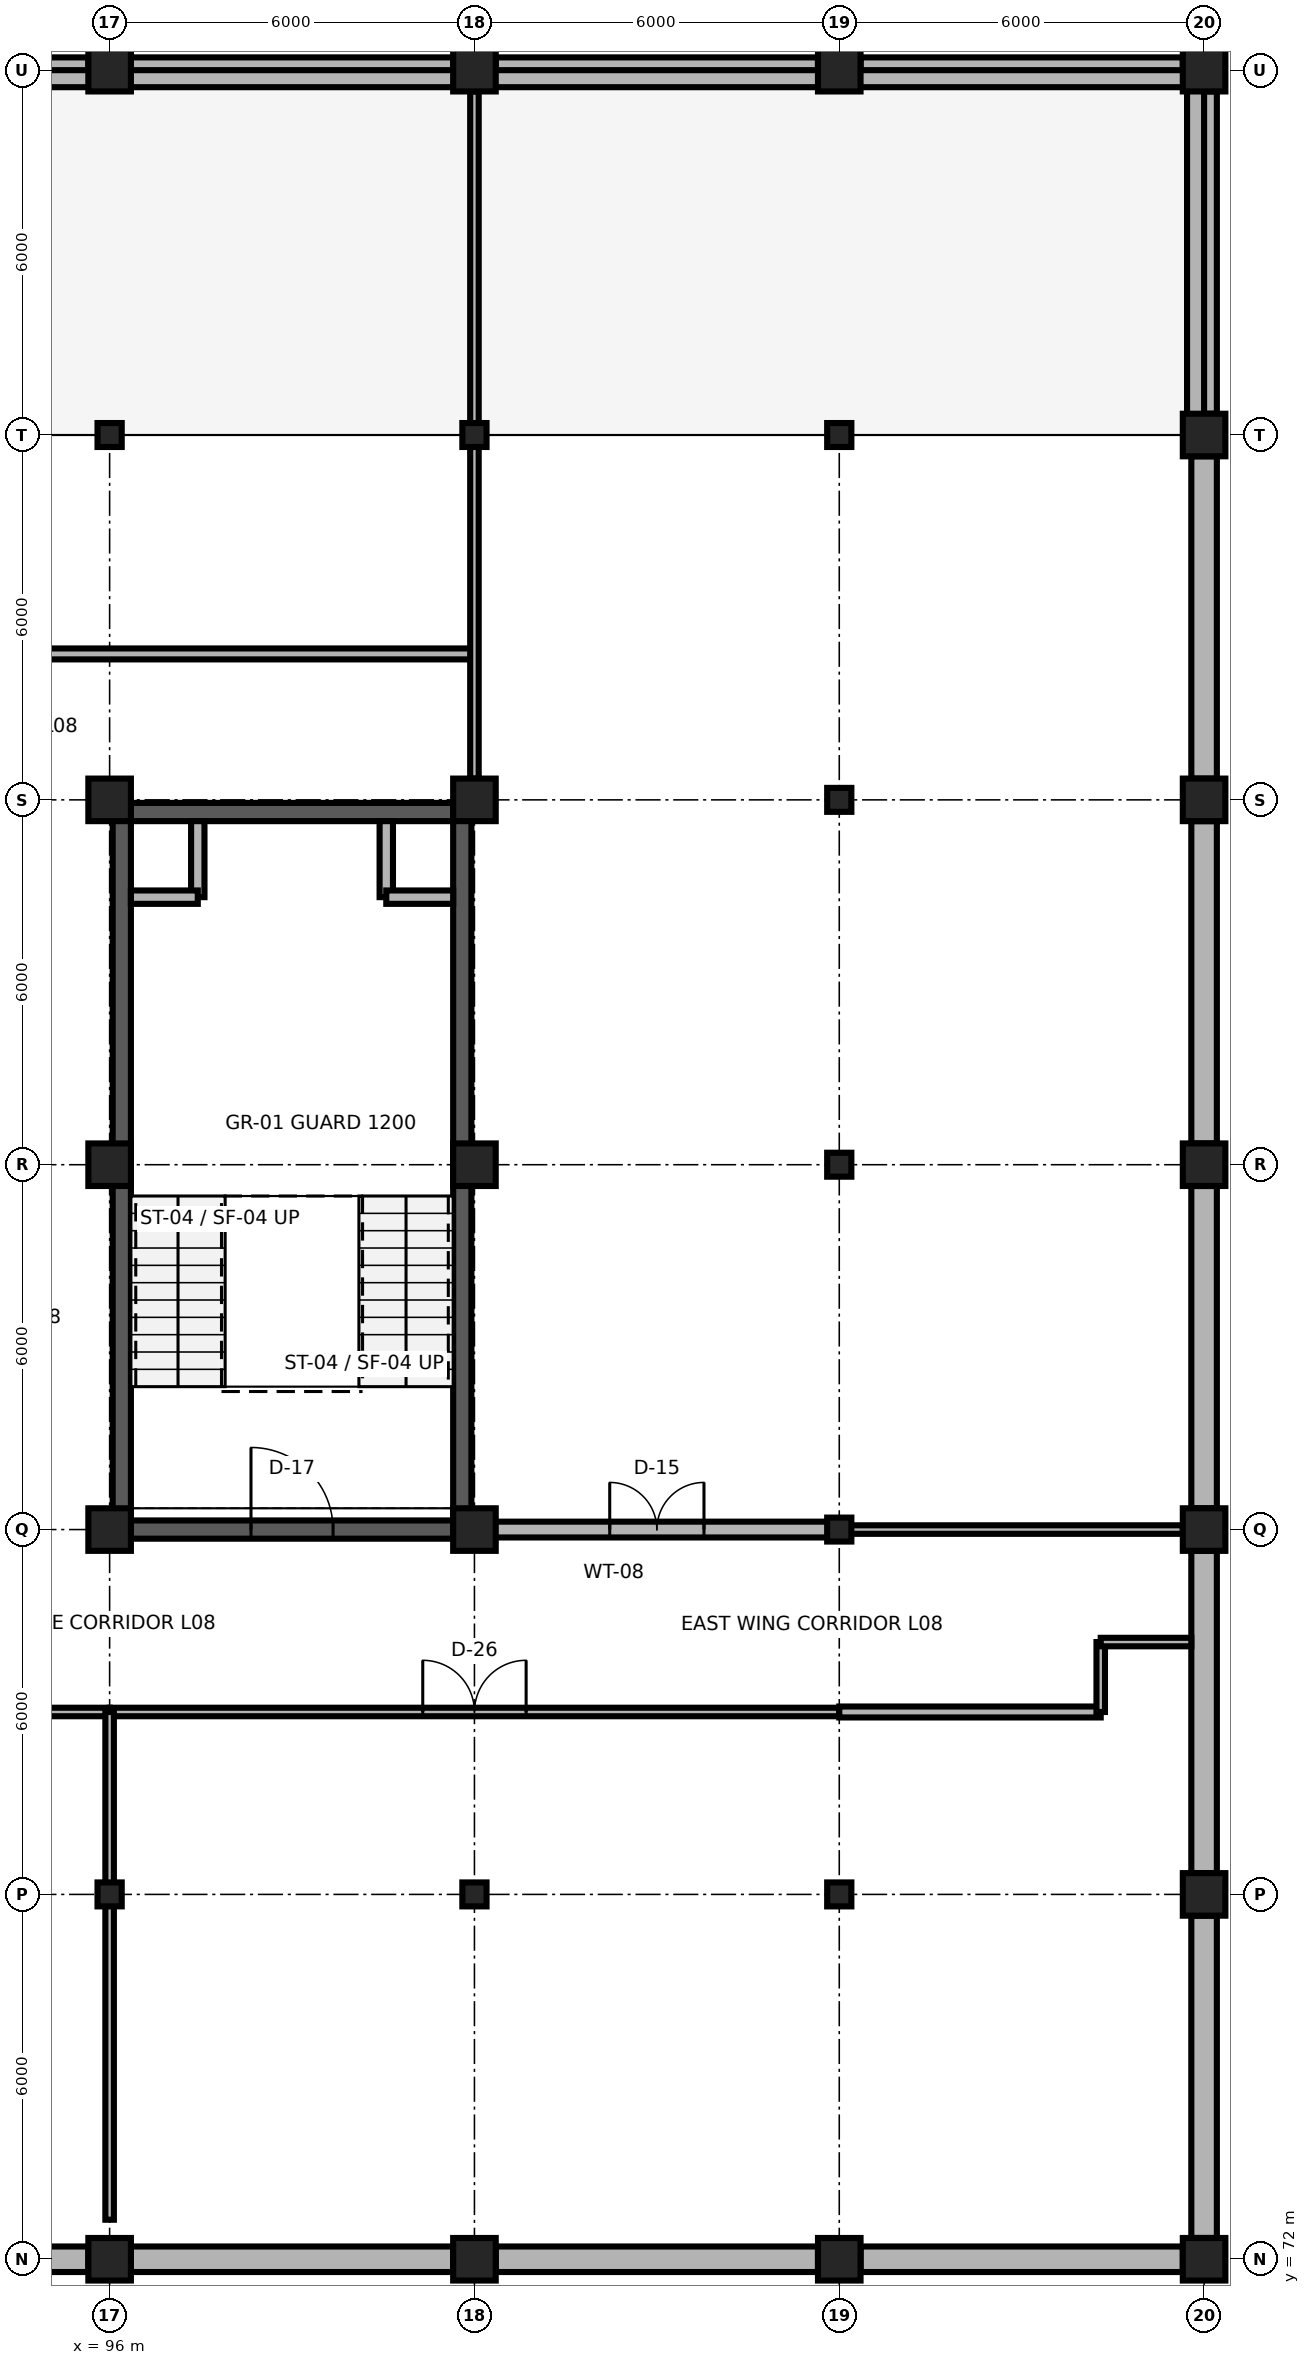
"""IFC4 building model, lengths in metres.
Left out: names, types, materials, properties, quantities, classifications, styles, units other than length and angle.
Written with IfcOpenShell. Run it as: python <this file> out.ifc"""

import sys

from ifc_helpers import new_model, si_unit, direction, frame, frame_2d, origin, origin_2d, place, context, subcontext, project, spatial, rectangle, i_section, extrude, element, fill, save


model = new_model("IFC4")
c1 = context("Model", 3, precision=1e-05, world=origin(), true_north=direction((0.0, 1.0)))
c2 = subcontext(c1, "Body", "Model", "MODEL_VIEW")
j1 = project(units=[si_unit("LENGTHUNIT", "METRE"), si_unit("PLANEANGLEUNIT", "RADIAN")], contexts=[c1])
p1 = place(None, origin())
s1 = spatial("IfcSite", under=j1, at=p1, CompositionType="ELEMENT")
p2 = place(p1, origin())
s2 = spatial("IfcBuilding", under=s1, at=p2, CompositionType="ELEMENT")
p3 = place(p2, frame((0.0, 0.0, 32.7)))
s3 = spatial("IfcBuildingStorey", under=s2, at=p3, CompositionType="ELEMENT", Elevation=32.7)
for number, where, z_axis, x_axis in (
    (1, (96.0, 72.0, 0.0), (0.0, 0.0, 1.0), (1.0, 0.0, 0.0)),
    (2, (102.0, 72.0, 0.0), (0.0, 0.0, 1.0), (1.0, 0.0, 0.0)),
    (3, (108.0, 72.0, 0.0), (0.0, 0.0, 1.0), (1.0, 0.0, 0.0)),
):
    element("IfcColumn", number, at=place(p3, frame(where, z_axis=z_axis, x_axis=x_axis)), inside=s3, PredefinedType="COLUMN", context=c2, shape_type="SweptSolid", body=[
        extrude(rectangle(XDim=0.7, YDim=0.7, at=origin_2d()), origin(), (0.0, 0.0, 1.0), 3.9),
    ])
p4 = place(p3, frame((114.0, 72.0, 0.0), z_axis=(0.0, 0.0, 1.0), x_axis=(1.0, 0.0, 0.0)))
e4 = element("IfcColumn", 4, at=p4, inside=s3, PredefinedType="COLUMN", context=c2, shape_type="SweptSolid", body=[
    extrude(rectangle(XDim=0.7, YDim=0.7, at=origin_2d()), origin(), (0.0, 0.0, 1.0), 3.68),
])
for number, where, z_axis, x_axis in (
    (5, (96.0, 78.0, 0.0), (0.0, 0.0, 1.0), (1.0, 0.0, 0.0)),
    (6, (102.0, 78.0, 0.0), (0.0, 0.0, 1.0), (1.0, 0.0, 0.0)),
    (7, (108.0, 78.0, 0.0), (0.0, 0.0, 1.0), (1.0, 0.0, 0.0)),
):
    element("IfcColumn", number, at=place(p3, frame(where, z_axis=z_axis, x_axis=x_axis)), inside=s3, PredefinedType="COLUMN", context=c2, shape_type="SweptSolid", body=[
        extrude(i_section(OverallWidth=0.398, OverallDepth=0.394, WebThickness=0.011, FlangeThickness=0.018, FilletRadius=0.022, at=origin_2d()), origin(), (0.0, 0.0, 1.0), 3.9),
    ])
p5 = place(p3, frame((114.0, 78.0, 0.0), z_axis=(0.0, 0.0, 1.0), x_axis=(1.0, 0.0, 0.0)))
e8 = element("IfcColumn", 8, at=p5, inside=s3, PredefinedType="COLUMN", context=c2, shape_type="SweptSolid", body=[
    extrude(rectangle(XDim=0.7, YDim=0.7, at=origin_2d()), origin(), (0.0, 0.0, 1.0), 3.68),
])
for number, where, z_axis, x_axis in (
    (9, (96.0, 84.0, 0.0), (0.0, 0.0, 1.0), (1.0, 0.0, 0.0)),
    (10, (102.0, 84.0, 0.0), (0.0, 0.0, 1.0), (1.0, 0.0, 0.0)),
):
    element("IfcColumn", number, at=place(p3, frame(where, z_axis=z_axis, x_axis=x_axis)), inside=s3, PredefinedType="COLUMN", context=c2, shape_type="SweptSolid", body=[
        extrude(rectangle(XDim=0.7, YDim=0.7, at=origin_2d()), origin(), (0.0, 0.0, 1.0), 3.9),
    ])
p6 = place(p3, frame((108.0, 84.0, 0.0), z_axis=(0.0, 0.0, 1.0), x_axis=(1.0, 0.0, 0.0)))
e11 = element("IfcColumn", 11, at=p6, inside=s3, PredefinedType="COLUMN", context=c2, shape_type="SweptSolid", body=[
    extrude(i_section(OverallWidth=0.398, OverallDepth=0.394, WebThickness=0.011, FlangeThickness=0.018, FilletRadius=0.022, at=origin_2d()), origin(), (0.0, 0.0, 1.0), 3.9),
])
p7 = place(p3, frame((114.0, 84.0, 0.0), z_axis=(0.0, 0.0, 1.0), x_axis=(1.0, 0.0, 0.0)))
e12 = element("IfcColumn", 12, at=p7, inside=s3, PredefinedType="COLUMN", context=c2, shape_type="SweptSolid", body=[
    extrude(rectangle(XDim=0.7, YDim=0.7, at=origin_2d()), origin(), (0.0, 0.0, 1.0), 3.68),
])
for number, where, z_axis, x_axis in (
    (13, (96.0, 90.0, 0.0), (0.0, 0.0, 1.0), (1.0, 0.0, 0.0)),
    (14, (102.0, 90.0, 0.0), (0.0, 0.0, 1.0), (1.0, 0.0, 0.0)),
):
    element("IfcColumn", number, at=place(p3, frame(where, z_axis=z_axis, x_axis=x_axis)), inside=s3, PredefinedType="COLUMN", context=c2, shape_type="SweptSolid", body=[
        extrude(rectangle(XDim=0.7, YDim=0.7, at=origin_2d()), origin(), (0.0, 0.0, 1.0), 3.9),
    ])
p8 = place(p3, frame((108.0, 90.0, 0.0), z_axis=(0.0, 0.0, 1.0), x_axis=(1.0, 0.0, 0.0)))
e15 = element("IfcColumn", 15, at=p8, inside=s3, PredefinedType="COLUMN", context=c2, shape_type="SweptSolid", body=[
    extrude(i_section(OverallWidth=0.398, OverallDepth=0.394, WebThickness=0.011, FlangeThickness=0.018, FilletRadius=0.022, at=origin_2d()), origin(), (0.0, 0.0, 1.0), 3.9),
])
p9 = place(p3, frame((114.0, 90.0, 0.0), z_axis=(0.0, 0.0, 1.0), x_axis=(1.0, 0.0, 0.0)))
e16 = element("IfcColumn", 16, at=p9, inside=s3, PredefinedType="COLUMN", context=c2, shape_type="SweptSolid", body=[
    extrude(rectangle(XDim=0.7, YDim=0.7, at=origin_2d()), origin(), (0.0, 0.0, 1.0), 3.68),
])
for number, where, z_axis, x_axis in (
    (17, (96.0, 96.0, 0.0), (0.0, 0.0, 1.0), (1.0, 0.0, 0.0)),
    (18, (102.0, 96.0, 0.0), (0.0, 0.0, 1.0), (1.0, 0.0, 0.0)),
):
    element("IfcColumn", number, at=place(p3, frame(where, z_axis=z_axis, x_axis=x_axis)), inside=s3, PredefinedType="COLUMN", context=c2, shape_type="SweptSolid", body=[
        extrude(rectangle(XDim=0.7, YDim=0.7, at=origin_2d()), origin(), (0.0, 0.0, 1.0), 3.9),
    ])
p10 = place(p3, frame((108.0, 96.0, 0.0), z_axis=(0.0, 0.0, 1.0), x_axis=(1.0, 0.0, 0.0)))
e19 = element("IfcColumn", 19, at=p10, inside=s3, PredefinedType="COLUMN", context=c2, shape_type="SweptSolid", body=[
    extrude(i_section(OverallWidth=0.398, OverallDepth=0.394, WebThickness=0.011, FlangeThickness=0.018, FilletRadius=0.022, at=origin_2d()), origin(), (0.0, 0.0, 1.0), 3.9),
])
p11 = place(p3, frame((114.0, 96.0, 0.0), z_axis=(0.0, 0.0, 1.0), x_axis=(1.0, 0.0, 0.0)))
e20 = element("IfcColumn", 20, at=p11, inside=s3, PredefinedType="COLUMN", context=c2, shape_type="SweptSolid", body=[
    extrude(rectangle(XDim=0.7, YDim=0.7, at=origin_2d()), origin(), (0.0, 0.0, 1.0), 3.68),
])
for number, where, z_axis, x_axis in (
    (21, (96.0, 102.0, 0.0), (0.0, 0.0, 1.0), (1.0, 0.0, 0.0)),
    (22, (102.0, 102.0, 0.0), (0.0, 0.0, 1.0), (1.0, 0.0, 0.0)),
    (23, (108.0, 102.0, 0.0), (0.0, 0.0, 1.0), (1.0, 0.0, 0.0)),
):
    element("IfcColumn", number, at=place(p3, frame(where, z_axis=z_axis, x_axis=x_axis)), inside=s3, PredefinedType="COLUMN", context=c2, shape_type="SweptSolid", body=[
        extrude(i_section(OverallWidth=0.398, OverallDepth=0.394, WebThickness=0.011, FlangeThickness=0.018, FilletRadius=0.022, at=origin_2d()), origin(), (0.0, 0.0, 1.0), 3.9),
    ])
p12 = place(p3, frame((114.0, 102.0, 0.0), z_axis=(0.0, 0.0, 1.0), x_axis=(1.0, 0.0, 0.0)))
e24 = element("IfcColumn", 24, at=p12, inside=s3, PredefinedType="COLUMN", context=c2, shape_type="SweptSolid", body=[
    extrude(rectangle(XDim=0.7, YDim=0.7, at=origin_2d()), origin(), (0.0, 0.0, 1.0), 3.68),
])
for number, where, z_axis, x_axis in (
    (25, (96.0, 108.0, 0.0), (0.0, 0.0, 1.0), (1.0, 0.0, 0.0)),
    (26, (102.0, 108.0, 0.0), (0.0, 0.0, 1.0), (1.0, 0.0, 0.0)),
    (27, (108.0, 108.0, 0.0), (0.0, 0.0, 1.0), (1.0, 0.0, 0.0)),
    (28, (114.0, 108.0, 0.0), (0.0, 0.0, 1.0), (1.0, 0.0, 0.0)),
):
    element("IfcColumn", number, at=place(p3, frame(where, z_axis=z_axis, x_axis=x_axis)), inside=s3, PredefinedType="COLUMN", context=c2, shape_type="SweptSolid", body=[
        extrude(rectangle(XDim=0.7, YDim=0.7, at=origin_2d()), origin(), (0.0, 0.0, 1.0), 3.4),
    ])
for number, where, z_axis, x_axis in (
    (29, (90.35, 72.0, 0.0), (0.0, 0.0, 1.0), (1.0, 0.0, 0.0)),
    (30, (96.35, 72.0, 0.0), (0.0, 0.0, 1.0), (1.0, 0.0, 0.0)),
    (31, (102.35, 72.0, 0.0), (0.0, 0.0, 1.0), (1.0, 0.0, 0.0)),
    (32, (108.35, 72.0, 0.0), (0.0, 0.0, 1.0), (1.0, 0.0, 0.0)),
    (33, (90.35, 108.0, 0.0), (0.0, 0.0, 1.0), (1.0, 0.0, 0.0)),
    (34, (96.35, 108.0, 0.0), (0.0, 0.0, 1.0), (1.0, 0.0, 0.0)),
    (35, (102.35, 108.0, 0.0), (0.0, 0.0, 1.0), (1.0, 0.0, 0.0)),
    (36, (108.35, 108.0, 0.0), (0.0, 0.0, 1.0), (1.0, 0.0, 0.0)),
    (37, (114.0, 72.35, 0.0), (0.0, 0.0, 1.0), (0.0, 1.0, 0.0)),
    (38, (114.0, 78.35, 0.0), (0.0, 0.0, 1.0), (0.0, 1.0, 0.0)),
    (39, (114.0, 84.35, 0.0), (0.0, 0.0, 1.0), (0.0, 1.0, 0.0)),
    (40, (114.0, 90.35, 0.0), (0.0, 0.0, 1.0), (0.0, 1.0, 0.0)),
    (41, (114.0, 96.35, 0.0), (0.0, 0.0, 1.0), (0.0, 1.0, 0.0)),
    (42, (114.0, 102.35, 0.0), (0.0, 0.0, 1.0), (0.0, 1.0, 0.0)),
):
    element("IfcWall", number, at=place(p3, frame(where, z_axis=z_axis, x_axis=x_axis)), inside=s3, PredefinedType="SOLIDWALL", context=c2, shape_type="SweptSolid", body=[
        extrude(rectangle(XDim=5.3, YDim=0.42, at=frame_2d((2.65, 0.0))), origin(), (0.0, 0.0, 1.0), 2.98),
    ])
p13 = place(p3, frame((54.0, 107.86, 3.6), z_axis=(0.0, 0.0, 1.0), x_axis=(1.0, 0.0, 0.0)))
e43 = element("IfcWall", 43, at=p13, inside=s3, PredefinedType="PARAPET", context=c2, shape_type="SweptSolid", body=[
    extrude(rectangle(XDim=60.0, YDim=0.28, at=frame_2d((30.0, 0.0))), origin(), (0.0, 0.0, 1.0), 0.85),
])
p14 = place(p3, frame((113.86, 102.0, 3.6), z_axis=(0.0, 0.0, 1.0), x_axis=(0.0, 1.0, 0.0)))
e44 = element("IfcWall", 44, at=p14, inside=s3, PredefinedType="PARAPET", context=c2, shape_type="SweptSolid", body=[
    extrude(rectangle(XDim=6.0, YDim=0.28, at=frame_2d((3.0, 0.0))), origin(), (0.0, 0.0, 1.0), 0.85),
])
p15 = place(p3, frame((96.35, 84.0, 0.0), z_axis=(0.0, 0.0, 1.0), x_axis=(1.0, 0.0, 0.0)))
e45 = element("IfcWall", 45, at=p15, inside=s3, PredefinedType="SHEAR", context=c2, shape_type="SweptSolid", body=[
    extrude(rectangle(XDim=5.3, YDim=0.3, at=frame_2d((2.65, 0.0))), origin(), (0.0, 0.0, 1.0), 3.66),
])
p16 = place(p15, frame((1.975, 0.0, 0.0)))
e46 = element("IfcOpeningElement", 46, at=p16, cuts=e45, PredefinedType="OPENING", context=c2, shape_type="SweptSolid", body=[
    extrude(rectangle(XDim=1.35, YDim=2.2, at=frame_2d((0.675, 1.1))), frame((0.0, 0.165, 0.0), z_axis=(0.0, -1.0, 0.0), x_axis=(1.0, 0.0, 0.0)), (0.0, 0.0, 1.0), 0.33),
])
p17 = place(p3, frame((96.35, 95.8, 0.0), z_axis=(0.0, 0.0, 1.0), x_axis=(1.0, 0.0, 0.0)))
e47 = element("IfcWall", 47, at=p17, inside=s3, PredefinedType="SHEAR", context=c2, shape_type="SweptSolid", body=[
    extrude(rectangle(XDim=5.3, YDim=0.3, at=frame_2d((2.65, 0.0))), origin(), (0.0, 0.0, 1.0), 3.74),
])
for number, where, z_axis, x_axis in (
    (48, (96.2, 84.0, 0.0), (0.0, 0.0, 1.0), (0.0, 1.0, 0.0)),
    (49, (101.8, 84.0, 0.0), (0.0, 0.0, 1.0), (0.0, 1.0, 0.0)),
):
    element("IfcWall", number, at=place(p3, frame(where, z_axis=z_axis, x_axis=x_axis)), inside=s3, PredefinedType="SHEAR", context=c2, shape_type="SweptSolid", body=[
        extrude(rectangle(XDim=11.8, YDim=0.3, at=frame_2d((5.9, 0.0))), origin(), (0.0, 0.0, 1.0), 3.74),
    ])
p18 = place(p3, frame((97.45, 94.4, 0.0), z_axis=(0.0, 0.0, 1.0), x_axis=(0.0, 1.0, 0.0)))
e50 = element("IfcWall", 50, at=p18, inside=s3, PredefinedType="PARTITIONING", context=c2, shape_type="SweptSolid", body=[
    extrude(rectangle(XDim=1.25, YDim=0.22, at=frame_2d((0.625, 0.0))), origin(), (0.0, 0.0, 1.0), 3.74),
])
p19 = place(p3, frame((96.35, 94.4, 0.0), z_axis=(0.0, 0.0, 1.0), x_axis=(1.0, 0.0, 0.0)))
e51 = element("IfcWall", 51, at=p19, inside=s3, PredefinedType="PARTITIONING", context=c2, shape_type="SweptSolid", body=[
    extrude(rectangle(XDim=1.1, YDim=0.22, at=frame_2d((0.55, 0.0))), origin(), (0.0, 0.0, 1.0), 3.74),
])
p20 = place(p3, frame((100.55, 94.4, 0.0), z_axis=(0.0, 0.0, 1.0), x_axis=(0.0, 1.0, 0.0)))
e52 = element("IfcWall", 52, at=p20, inside=s3, PredefinedType="PARTITIONING", context=c2, shape_type="SweptSolid", body=[
    extrude(rectangle(XDim=1.25, YDim=0.22, at=frame_2d((0.625, 0.0))), origin(), (0.0, 0.0, 1.0), 3.74),
])
p21 = place(p3, frame((100.55, 94.4, 0.0), z_axis=(0.0, 0.0, 1.0), x_axis=(1.0, 0.0, 0.0)))
e53 = element("IfcWall", 53, at=p21, inside=s3, PredefinedType="PARTITIONING", context=c2, shape_type="SweptSolid", body=[
    extrude(rectangle(XDim=1.1, YDim=0.22, at=frame_2d((0.55, 0.0))), origin(), (0.0, 0.0, 1.0), 3.74),
])
p22 = place(p3, frame((84.0, 81.0, 0.0), z_axis=(0.0, 0.0, 1.0), x_axis=(1.0, 0.0, 0.0)))
e54 = element("IfcWall", 54, at=p22, inside=s3, PredefinedType="PARTITIONING", context=c2, shape_type="SweptSolid", body=[
    extrude(rectangle(XDim=12.0, YDim=0.14, at=frame_2d((6.0, 0.0))), origin(), (0.0, 0.0, 1.0), 3.4),
])
p23 = place(p22, frame((5.15, 0.0, 0.0)))
e55 = element("IfcOpeningElement", 55, at=p23, cuts=e54, PredefinedType="OPENING", context=c2, shape_type="SweptSolid", body=[
    extrude(rectangle(XDim=1.7, YDim=2.45, at=frame_2d((0.85, 1.225))), frame((0.0, 0.085, 0.0), z_axis=(0.0, -1.0, 0.0), x_axis=(1.0, 0.0, 0.0)), (0.0, 0.0, 1.0), 0.17),
])
p24 = place(p3, frame((96.0, 81.0, 0.0), z_axis=(0.0, 0.0, 1.0), x_axis=(1.0, 0.0, 0.0)))
e56 = element("IfcWall", 56, at=p24, inside=s3, PredefinedType="PARTITIONING", context=c2, shape_type="SweptSolid", body=[
    extrude(rectangle(XDim=12.0, YDim=0.14, at=frame_2d((6.0, 0.0))), origin(), (0.0, 0.0, 1.0), 3.4),
])
p25 = place(p24, frame((5.15, 0.0, 0.0)))
e57 = element("IfcOpeningElement", 57, at=p25, cuts=e56, PredefinedType="OPENING", context=c2, shape_type="SweptSolid", body=[
    extrude(rectangle(XDim=1.7, YDim=2.45, at=frame_2d((0.85, 1.225))), frame((0.0, 0.085, 0.0), z_axis=(0.0, -1.0, 0.0), x_axis=(1.0, 0.0, 0.0)), (0.0, 0.0, 1.0), 0.17),
])
p26 = place(p3, frame((102.0, 84.0, 0.0), z_axis=(0.0, 0.0, 1.0), x_axis=(1.0, 0.0, 0.0)))
e58 = element("IfcWall", 58, at=p26, inside=s3, PredefinedType="PARTITIONING", context=c2, shape_type="SweptSolid", body=[
    extrude(rectangle(XDim=6.0, YDim=0.26, at=frame_2d((3.0, 0.0))), origin(), (0.0, 0.0, 1.0), 3.012),
])
p27 = place(p26, frame((2.225, 0.0, 0.0)))
e59 = element("IfcOpeningElement", 59, at=p27, cuts=e58, PredefinedType="OPENING", context=c2, shape_type="SweptSolid", body=[
    extrude(rectangle(XDim=1.55, YDim=2.3, at=frame_2d((0.775, 1.15))), frame((0.0, 0.145, 0.0), z_axis=(0.0, -1.0, 0.0), x_axis=(1.0, 0.0, 0.0)), (0.0, 0.0, 1.0), 0.29),
])
p28 = place(p3, frame((96.0, 72.65, 0.0), z_axis=(0.0, 0.0, 1.0), x_axis=(0.0, 1.0, 0.0)))
e60 = element("IfcWall", 60, at=p28, inside=s3, PredefinedType="PARTITIONING", context=c2, shape_type="SweptSolid", body=[
    extrude(rectangle(XDim=8.35, YDim=0.14, at=frame_2d((4.175, 0.0))), origin(), (0.0, 0.0, 1.0), 3.012),
])
p29 = place(p3, frame((108.0, 81.0, 0.0), z_axis=(0.0, 0.0, 1.0), x_axis=(1.0, 0.0, 0.0)))
e61 = element("IfcWall", 61, at=p29, inside=s3, PredefinedType="PARTITIONING", context=c2, shape_type="SweptSolid", body=[
    extrude(rectangle(XDim=4.3, YDim=0.18, at=frame_2d((2.15, 0.0))), origin(), (0.0, 0.0, 1.0), 3.4),
])
p30 = place(p3, frame((112.3, 81.0, 0.0), z_axis=(0.0, 0.0, 1.0), x_axis=(0.0, 1.0, 0.0)))
e62 = element("IfcWall", 62, at=p30, inside=s3, PredefinedType="PARTITIONING", context=c2, shape_type="SweptSolid", body=[
    extrude(rectangle(XDim=1.15, YDim=0.14, at=frame_2d((0.575, 0.0))), origin(), (0.0, 0.0, 1.0), 3.4),
])
p31 = place(p3, frame((112.3, 82.15, 0.0), z_axis=(0.0, 0.0, 1.0), x_axis=(1.0, 0.0, 0.0)))
e63 = element("IfcWall", 63, at=p31, inside=s3, PredefinedType="PARTITIONING", context=c2, shape_type="SweptSolid", body=[
    extrude(rectangle(XDim=1.49, YDim=0.14, at=frame_2d((0.745, 0.0))), origin(), (0.0, 0.0, 1.0), 3.4),
])
p32 = place(p3, frame((90.0, 98.4, 0.0), z_axis=(0.0, 0.0, 1.0), x_axis=(1.0, 0.0, 0.0)))
e64 = element("IfcWall", 64, at=p32, inside=s3, PredefinedType="PARTITIONING", context=c2, shape_type="SweptSolid", body=[
    extrude(rectangle(XDim=12.0, YDim=0.18, at=frame_2d((6.0, 0.0))), origin(), (0.0, 0.0, 1.0), 3.4),
])
p33 = place(p3, frame((102.0, 96.35, 0.0), z_axis=(0.0, 0.0, 1.0), x_axis=(0.0, 1.0, 0.0)))
e65 = element("IfcWall", 65, at=p33, inside=s3, PredefinedType="PARTITIONING", context=c2, shape_type="SweptSolid", body=[
    extrude(rectangle(XDim=11.3, YDim=0.14, at=frame_2d((5.65, 0.0))), origin(), (0.0, 0.0, 1.0), 3.012),
])
p34 = place(p3, frame((108.0, 84.0, 0.0), z_axis=(0.0, 0.0, 1.0), x_axis=(1.0, 0.0, 0.0)))
e66 = element("IfcWall", 66, at=p34, inside=s3, PredefinedType="PARTITIONING", context=c2, shape_type="SweptSolid", body=[
    extrude(rectangle(XDim=5.65, YDim=0.14, at=frame_2d((2.825, 0.0))), origin(), (0.0, 0.0, 1.0), 3.012),
])
p35 = place(p16, origin())
e67 = element("IfcDoor", 67, at=p35, inside=s3, OperationType="SINGLE_SWING_LEFT", PredefinedType="DOOR", context=c2, shape_type="SweptSolid", body=[
    extrude(rectangle(XDim=1.35, YDim=2.2, at=frame_2d((0.675, 1.1))), frame((0.0, 0.025, 0.0), z_axis=(0.0, -1.0, 0.0), x_axis=(1.0, 0.0, 0.0)), (0.0, 0.0, 1.0), 0.05),
])
fill(e46, e67)
p36 = place(p25, origin())
e68 = element("IfcDoor", 68, at=p36, inside=s3, OperationType="DOUBLE_DOOR_SINGLE_SWING", PredefinedType="DOOR", context=c2, shape_type="SweptSolid", body=[
    extrude(rectangle(XDim=1.7, YDim=2.45, at=frame_2d((0.85, 1.225))), frame((0.0, 0.025, 0.0), z_axis=(0.0, -1.0, 0.0), x_axis=(1.0, 0.0, 0.0)), (0.0, 0.0, 1.0), 0.05),
])
fill(e57, e68)
p37 = place(p27, origin())
e69 = element("IfcDoor", 69, at=p37, inside=s3, OperationType="DOUBLE_DOOR_SINGLE_SWING", PredefinedType="DOOR", context=c2, shape_type="SweptSolid", body=[
    extrude(rectangle(XDim=1.55, YDim=2.3, at=frame_2d((0.775, 1.15))), frame((0.0, 0.025, 0.0), z_axis=(0.0, -1.0, 0.0), x_axis=(1.0, 0.0, 0.0)), (0.0, 0.0, 1.0), 0.05),
])
fill(e59, e69)
save(model, sys.argv[1])
